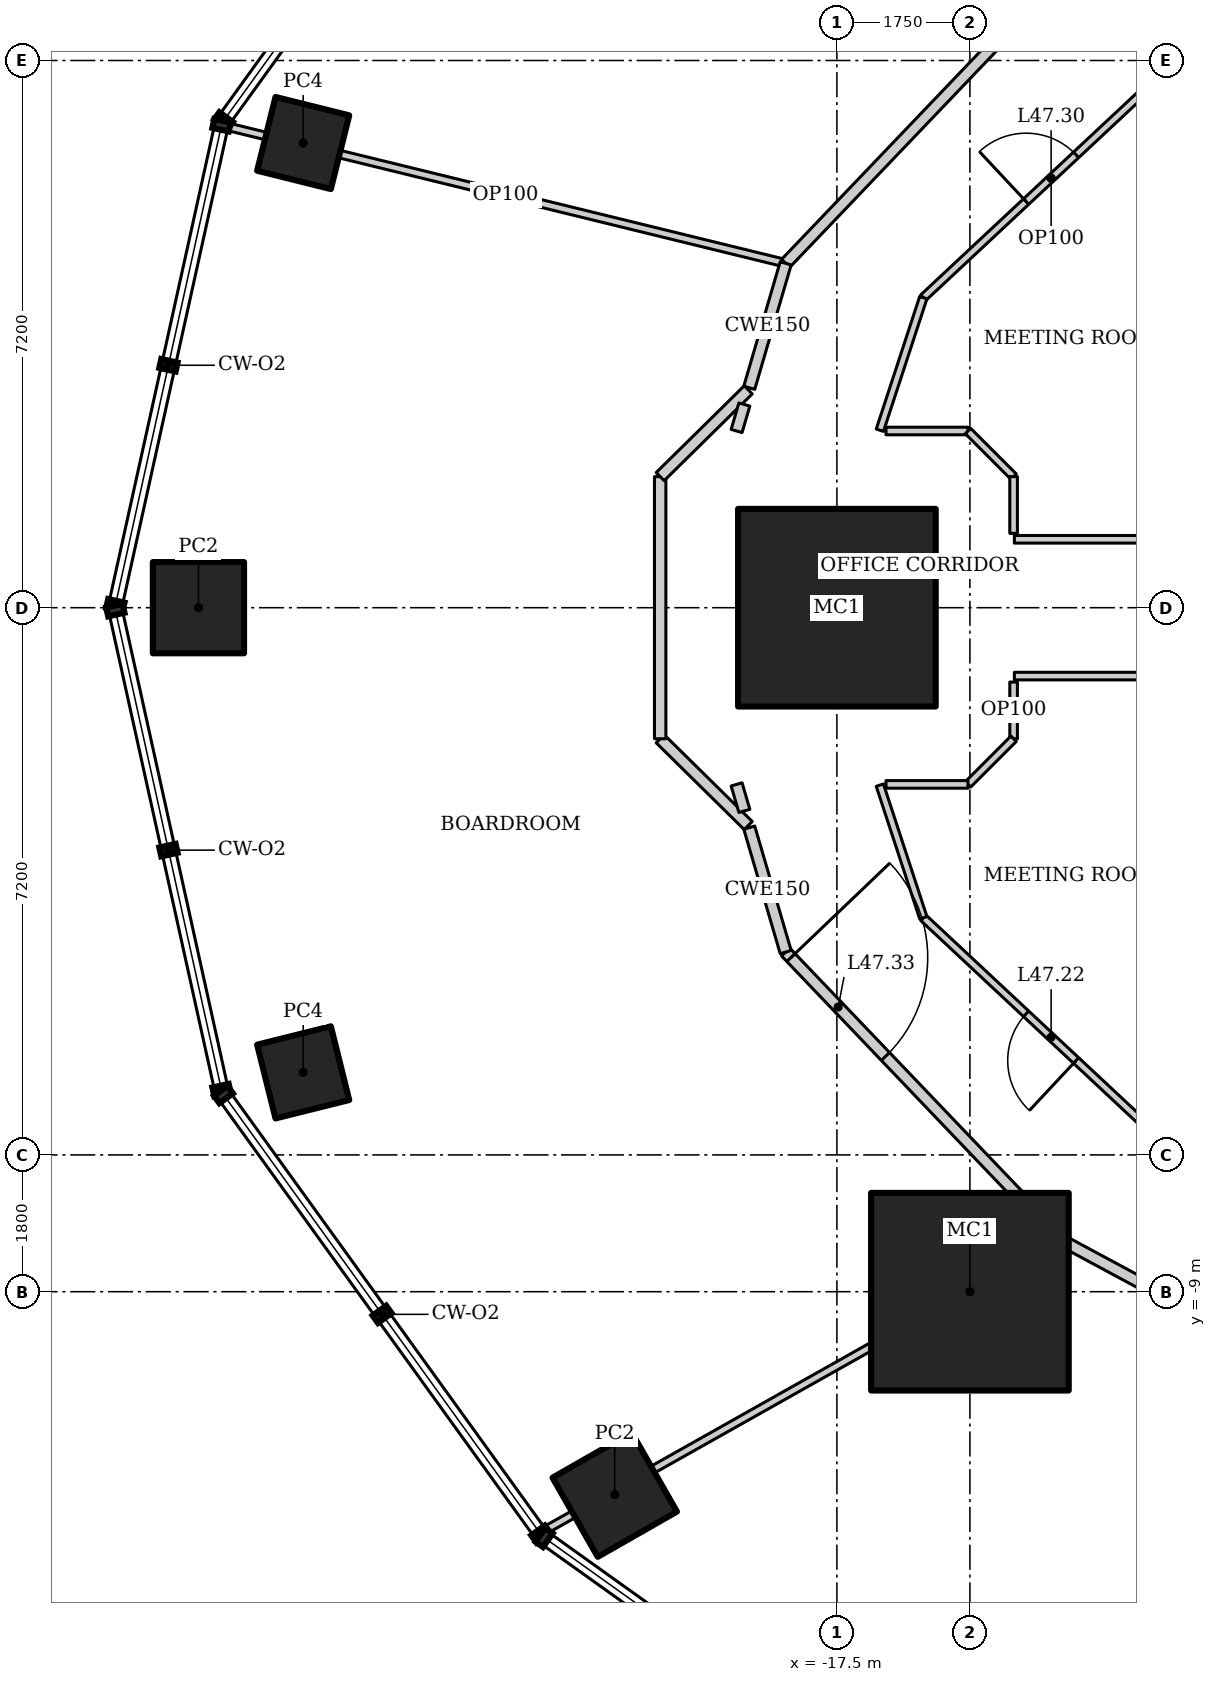
"""IFC4 building model, lengths in metres.
Left out: names, types, materials, properties, quantities, classifications, styles, units other than length and angle.
Written with IfcOpenShell. Run it as: python <this file> out.ifc"""

import sys

from ifc_helpers import new_model, si_unit, direction, frame, frame_2d, origin, origin_2d, place, context, subcontext, project, spatial, rectangle, hollow_rectangle, extrude, element, fill, save


model = new_model("IFC4")
c1 = context("Model", 3, precision=1e-05, world=origin(), true_north=direction((0.0, 1.0)))
c2 = subcontext(c1, "Body", "Model", "MODEL_VIEW")
j1 = project(units=[si_unit("LENGTHUNIT", "METRE"), si_unit("PLANEANGLEUNIT", "RADIAN")], contexts=[c1])
p1 = place(None, origin())
s1 = spatial("IfcSite", under=j1, at=p1, CompositionType="ELEMENT")
p2 = place(p1, origin())
s2 = spatial("IfcBuilding", under=s1, at=p2, CompositionType="ELEMENT")
p3 = place(p2, frame((0.0, 0.0, 203.2)))
s3 = spatial("IfcBuildingStorey", under=s2, at=p3, CompositionType="ELEMENT", Elevation=203.2)
for number, where, z_axis, x_axis in (
    (1, (-17.5, 0.0, 0.0), (0.0, 0.0, 1.0), (1.0, 0.0, 0.0)),
    (2, (-15.75, -9.0, 0.0), (0.0, 0.0, 1.0), (1.0, 0.0, 0.0)),
):
    element("IfcColumn", number, at=place(p3, frame(where, z_axis=z_axis, x_axis=x_axis)), inside=s3, PredefinedType="COLUMN", context=c2, shape_type="SweptSolid", body=[
        extrude(hollow_rectangle(XDim=2.6, YDim=2.6, WallThickness=0.13, at=origin_2d()), origin(), (0.0, 0.0, 1.0), 4.2),
    ])
p4 = place(p3, frame((-24.522, 6.114, 0.0), z_axis=(0.0, 0.0, 1.0), x_axis=(0.2419218956, 0.970295726276, 0.0)))
e3 = element("IfcColumn", 3, at=p4, inside=s3, PredefinedType="COLUMN", context=c2, shape_type="SweptSolid", body=[
    extrude(hollow_rectangle(XDim=1.0, YDim=1.0, WallThickness=0.08, at=origin_2d()), origin(), (0.0, 0.0, 1.0), 4.2),
])
p5 = place(p3, frame((-25.9, 0.0, 0.0), z_axis=(0.0, 0.0, 1.0), x_axis=(1.0, 0.0, 0.0)))
e4 = element("IfcColumn", 4, at=p5, inside=s3, PredefinedType="COLUMN", context=c2, shape_type="SweptSolid", body=[
    extrude(hollow_rectangle(XDim=1.2, YDim=1.2, WallThickness=0.1, at=origin_2d()), origin(), (0.0, 0.0, 1.0), 4.2),
])
p6 = place(p3, frame((-24.522, -6.114, 0.0), z_axis=(0.0, 0.0, 1.0), x_axis=(0.970295726276, 0.2419218956, 0.0)))
e5 = element("IfcColumn", 5, at=p6, inside=s3, PredefinedType="COLUMN", context=c2, shape_type="SweptSolid", body=[
    extrude(hollow_rectangle(XDim=1.0, YDim=1.0, WallThickness=0.08, at=origin_2d()), origin(), (0.0, 0.0, 1.0), 4.2),
])
p7 = place(p3, frame((-20.423, -11.67, 0.0), z_axis=(0.0, 0.0, 1.0), x_axis=(0.86824298017, 0.496139221777, 0.0)))
e6 = element("IfcColumn", 6, at=p7, inside=s3, PredefinedType="COLUMN", context=c2, shape_type="SweptSolid", body=[
    extrude(hollow_rectangle(XDim=1.2, YDim=1.2, WallThickness=0.1, at=origin_2d()), origin(), (0.0, 0.0, 1.0), 4.2),
])
p8 = place(p3, frame((-25.543, 6.336, 0.0), z_axis=(0.0, 0.0, 1.0), x_axis=(0.97130474594, -0.237838370569, 0.0)))
e7 = element("IfcWall", 7, at=p8, inside=s3, PredefinedType="PARTITIONING", context=c2, shape_type="SweptSolid", body=[
    extrude(rectangle(XDim=7.587, YDim=0.1, at=frame_2d((3.793, 0.0))), origin(), (0.0, 0.0, 1.0), 3.108),
])
p9 = place(p3, frame((-21.358, -12.15, 0.0), z_axis=(0.0, 0.0, 1.0), x_axis=(0.871273053995, 0.490798599614, 0.0)))
e8 = element("IfcWall", 8, at=p9, inside=s3, PredefinedType="PARTITIONING", context=c2, shape_type="SweptSolid", body=[
    extrude(rectangle(XDim=7.807, YDim=0.1, at=frame_2d((3.904, 0.0))), origin(), (0.0, 0.0, 1.0), 3.524),
])
p10 = place(p3, frame((-14.556, 8.318, 0.0), z_axis=(0.0, 0.0, 1.0), x_axis=(-0.690768413292, -0.723076067366, 0.0)))
e9 = element("IfcWall", 9, at=p10, inside=s3, PredefinedType="PARTITIONING", context=c2, shape_type="SweptSolid", body=[
    extrude(rectangle(XDim=5.237, YDim=0.15, at=frame_2d((2.618, 0.0))), origin(), (0.0, 0.0, 1.0), 4.05),
])
p11 = place(p3, frame((-18.174, -4.531, 0.0), z_axis=(0.0, 0.0, 1.0), x_axis=(0.690768413292, -0.723076067366, 0.0)))
e10 = element("IfcWall", 10, at=p11, inside=s3, PredefinedType="PARTITIONING", context=c2, shape_type="SweptSolid", body=[
    extrude(rectangle(XDim=5.237, YDim=0.15, at=frame_2d((2.618, 0.0))), origin(), (0.0, 0.0, 1.0), 4.05),
])
p12 = place(p11, frame((0.1, 0.0, 0.0)))
e11 = element("IfcOpeningElement", 11, at=p12, cuts=e10, PredefinedType="OPENING", context=c2, shape_type="SweptSolid", body=[
    extrude(rectangle(XDim=1.8, YDim=2.1, at=frame_2d((0.9, 1.05))), frame((0.0, 0.085, 0.0), z_axis=(0.0, -1.0, 0.0), x_axis=(1.0, 0.0, 0.0)), (0.0, 0.0, 1.0), 0.17),
])
p13 = place(p3, frame((-14.556, -8.318, 0.0), z_axis=(0.0, 0.0, 1.0), x_axis=(0.88053863253, -0.47397438393, 0.0)))
e12 = element("IfcWall", 12, at=p13, inside=s3, PredefinedType="PARTITIONING", context=c2, shape_type="SweptSolid", body=[
    extrude(rectangle(XDim=4.875, YDim=0.15, at=frame_2d((2.438, 0.0))), origin(), (0.0, 0.0, 1.0), 4.05),
])
p14 = place(p3, frame((-13.0, -7.222, 0.0), z_axis=(0.0, 0.0, 1.0), x_axis=(-0.730651186567, 0.682750938167, 0.0)))
e13 = element("IfcWall", 13, at=p14, inside=s3, PredefinedType="PARTITIONING", context=c2, shape_type="SweptSolid", body=[
    extrude(rectangle(XDim=4.603, YDim=0.1, at=frame_2d((2.301, 0.0))), origin(), (0.0, 0.0, 1.0), 4.05),
])
p15 = place(p14, frame((1.851, 0.0, 0.0)))
e14 = element("IfcOpeningElement", 14, at=p15, cuts=e13, PredefinedType="OPENING", context=c2, shape_type="SweptSolid", body=[
    extrude(rectangle(XDim=0.9, YDim=2.1, at=frame_2d((0.45, 1.05))), frame((0.0, 0.06, 0.0), z_axis=(0.0, -1.0, 0.0), x_axis=(1.0, 0.0, 0.0)), (0.0, 0.0, 1.0), 0.12),
])
p16 = place(p3, frame((-16.363, 4.08, 0.0), z_axis=(0.0, 0.0, 1.0), x_axis=(0.730651186567, 0.682750938167, 0.0)))
e15 = element("IfcWall", 15, at=p16, inside=s3, PredefinedType="PARTITIONING", context=c2, shape_type="SweptSolid", body=[
    extrude(rectangle(XDim=4.603, YDim=0.1, at=frame_2d((2.301, 0.0))), origin(), (0.0, 0.0, 1.0), 4.05),
])
p17 = place(p16, frame((1.851, 0.0, 0.0)))
e16 = element("IfcOpeningElement", 16, at=p17, cuts=e15, PredefinedType="OPENING", context=c2, shape_type="SweptSolid", body=[
    extrude(rectangle(XDim=0.9, YDim=2.1, at=frame_2d((0.45, 1.05))), frame((0.0, 0.06, 0.0), z_axis=(0.0, -1.0, 0.0), x_axis=(1.0, 0.0, 0.0)), (0.0, 0.0, 1.0), 0.12),
])
p18 = place(p3, frame((-12.6, -13.0, 0.0), z_axis=(0.0, 0.0, 1.0), x_axis=(-0.682434118301, -0.730947107648, 0.0)))
e17 = element("IfcWall", 17, at=p18, inside=s3, PredefinedType="PARTITIONING", context=c2, shape_type="SweptSolid", body=[
    extrude(rectangle(XDim=2.702, YDim=0.1, at=frame_2d((1.351, 0.0))), origin(), (0.0, 0.0, 1.0), 3.41),
])
for number, where, z_axis, x_axis in (
    (18, (-18.174, 4.531, 0.0), (0.0, 0.0, 1.0), (-0.281, -0.96, 0.0)),
    (19, (-18.653, -2.894, 0.0), (0.0, 0.0, 1.0), (0.281, -0.96, 0.0)),
):
    element("IfcWall", number, at=place(p3, frame(where, z_axis=z_axis, x_axis=x_axis)), inside=s3, PredefinedType="PARTITIONING", context=c2, shape_type="SweptSolid", body=[
        extrude(rectangle(XDim=1.706, YDim=0.15, at=frame_2d((0.853, 0.0))), origin(), (0.0, 0.0, 1.0), 4.05),
    ])
p19 = place(p3, frame((-16.363, -4.08, 0.0), z_axis=(0.0, 0.0, 1.0), x_axis=(-0.311517212063, 0.950240509865, 0.0)))
e20 = element("IfcWall", 20, at=p19, inside=s3, PredefinedType="PARTITIONING", context=c2, shape_type="SweptSolid", body=[
    extrude(rectangle(XDim=1.836, YDim=0.1, at=frame_2d((0.918, 0.0))), origin(), (0.0, 0.0, 1.0), 4.05),
])
for number, where, z_axis, x_axis in (
    (21, (-15.165, -0.9, 0.0), (0.0, 0.0, 1.0), (1.0, 0.0, 0.0)),
    (22, (-13.0, 0.9, 0.0), (0.0, 0.0, 1.0), (-1.0, 0.0, 0.0)),
):
    element("IfcWall", number, at=place(p3, frame(where, z_axis=z_axis, x_axis=x_axis)), inside=s3, PredefinedType="PARTITIONING", context=c2, shape_type="SweptSolid", body=[
        extrude(rectangle(XDim=2.165, YDim=0.1, at=frame_2d((1.083, 0.0))), origin(), (0.0, 0.0, 1.0), 4.05),
    ])
p20 = place(p3, frame((-16.935, 2.335, 0.0), z_axis=(0.0, 0.0, 1.0), x_axis=(0.311517212063, 0.950240509865, 0.0)))
e23 = element("IfcWall", 23, at=p20, inside=s3, PredefinedType="PARTITIONING", context=c2, shape_type="SweptSolid", body=[
    extrude(rectangle(XDim=1.836, YDim=0.1, at=frame_2d((0.918, 0.0))), origin(), (0.0, 0.0, 1.0), 4.05),
])
p21 = place(p3, frame((-15.175, -0.978, 0.0), z_axis=(0.0, 0.0, 1.0), x_axis=(0.0, -1.0, 0.0)))
e24 = element("IfcWall", 24, at=p21, inside=s3, PredefinedType="PARTITIONING", context=c2, shape_type="SweptSolid", body=[
    extrude(rectangle(XDim=0.746, YDim=0.1, at=frame_2d((0.373, 0.0))), origin(), (0.0, 0.0, 1.0), 4.05),
])
p22 = place(p3, frame((-15.175, -1.725, 0.0), z_axis=(0.0, 0.0, 1.0), x_axis=(-0.707106781187, -0.707106781187, 0.0)))
e25 = element("IfcWall", 25, at=p22, inside=s3, PredefinedType="PARTITIONING", context=c2, shape_type="SweptSolid", body=[
    extrude(rectangle(XDim=0.849, YDim=0.1, at=frame_2d((0.425, 0.0))), origin(), (0.0, 0.0, 1.0), 4.05),
])
for number, where, z_axis, x_axis in (
    (26, (-15.775, -2.325, 0.0), (0.0, 0.0, 1.0), (-1.0, 0.0, 0.0)),
    (27, (-16.854, 2.325, 0.0), (0.0, 0.0, 1.0), (1.0, 0.0, 0.0)),
):
    element("IfcWall", number, at=place(p3, frame(where, z_axis=z_axis, x_axis=x_axis)), inside=s3, PredefinedType="PARTITIONING", context=c2, shape_type="SweptSolid", body=[
        extrude(rectangle(XDim=1.078, YDim=0.1, at=frame_2d((0.539, 0.0))), origin(), (0.0, 0.0, 1.0), 4.05),
    ])
p23 = place(p3, frame((-15.775, 2.325, 0.0), z_axis=(0.0, 0.0, 1.0), x_axis=(0.707106781187, -0.707106781187, 0.0)))
e28 = element("IfcWall", 28, at=p23, inside=s3, PredefinedType="PARTITIONING", context=c2, shape_type="SweptSolid", body=[
    extrude(rectangle(XDim=0.849, YDim=0.1, at=frame_2d((0.425, 0.0))), origin(), (0.0, 0.0, 1.0), 4.05),
])
p24 = place(p3, frame((-15.175, 1.725, 0.0), z_axis=(0.0, 0.0, 1.0), x_axis=(0.0, -1.0, 0.0)))
e29 = element("IfcWall", 29, at=p24, inside=s3, PredefinedType="PARTITIONING", context=c2, shape_type="SweptSolid", body=[
    extrude(rectangle(XDim=0.746, YDim=0.1, at=frame_2d((0.373, 0.0))), origin(), (0.0, 0.0, 1.0), 4.05),
])
p25 = place(p3, frame((-18.666, -2.866, 0.0), z_axis=(0.0, 0.0, 1.0), x_axis=(-0.712265481509, 0.701910167935, 0.0)))
e30 = element("IfcWall", 30, at=p25, inside=s3, PredefinedType="PARTITIONING", context=c2, shape_type="SweptSolid", body=[
    extrude(rectangle(XDim=1.627, YDim=0.15, at=frame_2d((0.813, 0.0))), origin(), (0.0, 0.0, 1.0), 4.05),
])
p26 = place(p3, frame((-19.825, -1.725, 0.0), z_axis=(0.0, 0.0, 1.0), x_axis=(0.0, 1.0, 0.0)))
e31 = element("IfcWall", 31, at=p26, inside=s3, PredefinedType="PARTITIONING", context=c2, shape_type="SweptSolid", body=[
    extrude(rectangle(XDim=3.449, YDim=0.15, at=frame_2d((1.725, 0.0))), origin(), (0.0, 0.0, 1.0), 4.05),
])
p27 = place(p3, frame((-19.825, 1.725, 0.0), z_axis=(0.0, 0.0, 1.0), x_axis=(0.712265481509, 0.701910167935, 0.0)))
e32 = element("IfcWall", 32, at=p27, inside=s3, PredefinedType="PARTITIONING", context=c2, shape_type="SweptSolid", body=[
    extrude(rectangle(XDim=1.627, YDim=0.15, at=frame_2d((0.813, 0.0))), origin(), (0.0, 0.0, 1.0), 4.05),
])
for number, where, z_axis, x_axis in (
    (33, (-18.717, 2.674, 0.0), (0.0, 0.0, 1.0), (-0.281, -0.96, 0.0)),
    (34, (-18.82, -2.325, 0.0), (0.0, 0.0, 1.0), (0.281, -0.96, 0.0)),
):
    element("IfcWall", number, at=place(p3, frame(where, z_axis=z_axis, x_axis=x_axis)), inside=s3, PredefinedType="PARTITIONING", context=c2, shape_type="SweptSolid", body=[
        extrude(rectangle(XDim=0.364, YDim=0.15, at=frame_2d((0.182, 0.0))), origin(), (0.0, 0.0, 1.0), 4.05),
    ])
p28 = place(p15, origin())
e35 = element("IfcDoor", 35, at=p28, inside=s3, OperationType="SINGLE_SWING_LEFT", PredefinedType="DOOR", context=c2, shape_type="SweptSolid", body=[
    extrude(rectangle(XDim=0.9, YDim=2.1, at=frame_2d((0.45, 1.05))), frame((0.0, 0.025, 0.0), z_axis=(0.0, -1.0, 0.0), x_axis=(1.0, 0.0, 0.0)), (0.0, 0.0, 1.0), 0.05),
])
fill(e14, e35)
p29 = place(p17, origin())
e36 = element("IfcDoor", 36, at=p29, inside=s3, OperationType="SINGLE_SWING_LEFT", PredefinedType="DOOR", context=c2, shape_type="SweptSolid", body=[
    extrude(rectangle(XDim=0.9, YDim=2.1, at=frame_2d((0.45, 1.05))), frame((0.0, 0.025, 0.0), z_axis=(0.0, -1.0, 0.0), x_axis=(1.0, 0.0, 0.0)), (0.0, 0.0, 1.0), 0.05),
])
fill(e16, e36)
p30 = place(p12, origin())
e37 = element("IfcDoor", 37, at=p30, inside=s3, OperationType="DOUBLE_DOOR_DOUBLE_SWING", PredefinedType="DOOR", context=c2, shape_type="SweptSolid", body=[
    extrude(rectangle(XDim=1.8, YDim=2.1, at=frame_2d((0.9, 1.05))), frame((0.0, 0.025, 0.0), z_axis=(0.0, -1.0, 0.0), x_axis=(1.0, 0.0, 0.0)), (0.0, 0.0, 1.0), 0.05),
])
fill(e11, e37)
save(model, sys.argv[1])
